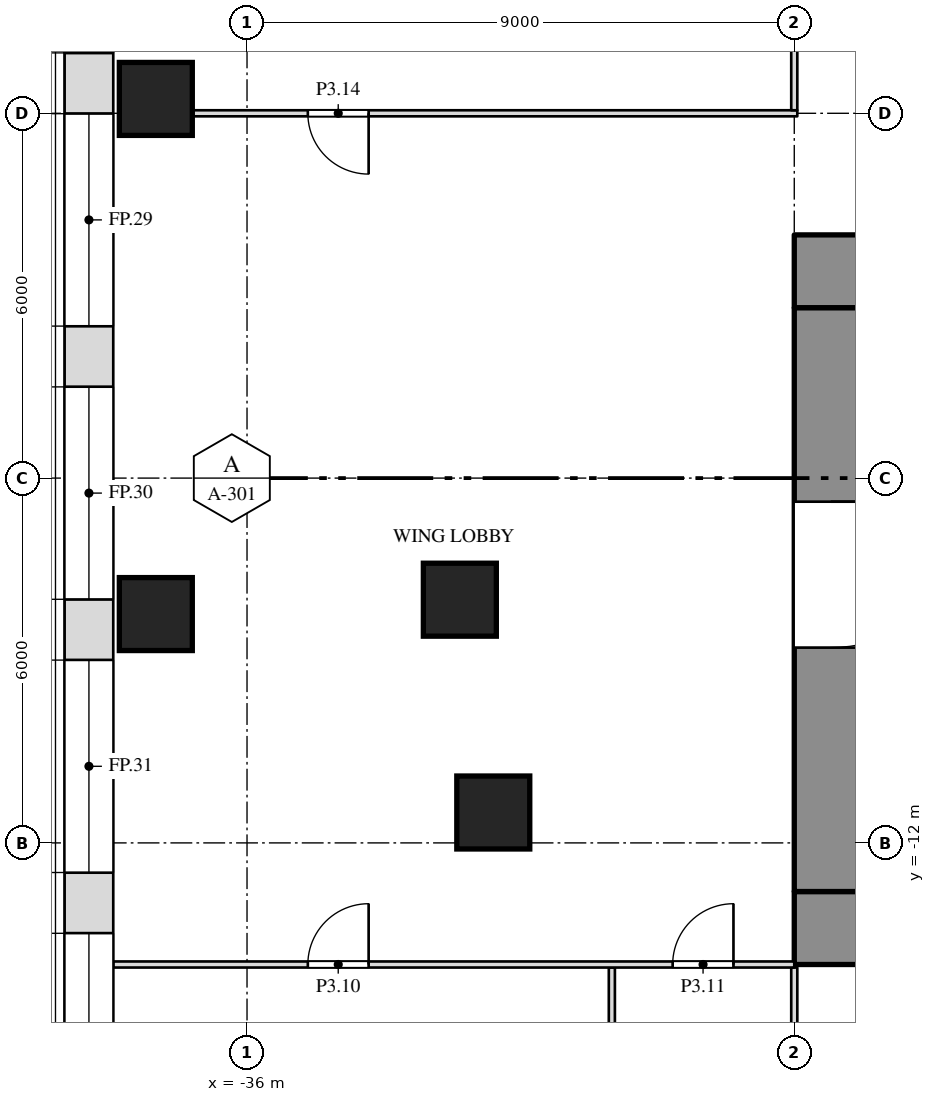
"""IFC4 building model, lengths in metres.
Left out: names, types, materials, properties, quantities, classifications, styles, units other than length and angle.
Written with IfcOpenShell. Run it as: python <this file> out.ifc"""

import sys

from ifc_helpers import new_model, si_unit, direction, frame, frame_2d, origin, origin_2d, place, context, subcontext, project, spatial, rectangle, extrude, element, fill, save


model = new_model("IFC4")
c1 = context("Model", 3, precision=1e-05, world=origin(), true_north=direction((0.0, 1.0)))
c2 = subcontext(c1, "Body", "Model", "MODEL_VIEW")
j1 = project(units=[si_unit("LENGTHUNIT", "METRE"), si_unit("PLANEANGLEUNIT", "RADIAN")], contexts=[c1])
p1 = place(None, origin())
s1 = spatial("IfcSite", under=j1, at=p1, CompositionType="ELEMENT")
p2 = place(p1, origin())
s2 = spatial("IfcBuilding", under=s1, at=p2, CompositionType="ELEMENT")
p3 = place(p2, frame((0.0, 0.0, 21.0)))
s3 = spatial("IfcBuildingStorey", under=s2, at=p3, CompositionType="ELEMENT", Elevation=21.0)
for number, where, z_axis, x_axis in (
    (1, (-31.95, -11.5, 0.0), (0.0, 0.0, 1.0), (1.0, 0.0, 0.0)),
    (2, (-37.5, -8.236, 0.0), (0.0, 0.0, 1.0), (1.0, 0.0, 0.0)),
    (3, (-32.5, -8.0, 0.0), (0.0, 0.0, 1.0), (1.0, 0.0, 0.0)),
    (4, (-37.5, 0.236, 0.0), (0.0, 0.0, 1.0), (1.0, 0.0, 0.0)),
):
    element("IfcColumn", number, at=place(p3, frame(where, z_axis=z_axis, x_axis=x_axis)), inside=s3, PredefinedType="COLUMN", context=c2, shape_type="SweptSolid", body=[
        extrude(rectangle(XDim=1.2, YDim=1.2, at=origin_2d()), origin(), (0.0, 0.0, 1.0), 6.0),
    ])
p4 = place(p3, frame((-27.0, -2.6, 0.0), z_axis=(0.0, 0.0, 1.0), x_axis=(1.0, 0.0, 0.0)))
e5 = element("IfcWall", 5, at=p4, inside=s3, PredefinedType="SHEAR", context=c2, shape_type="SweptSolid", body=[
    extrude(rectangle(XDim=54.0, YDim=1.2, at=frame_2d((27.0, 0.0))), origin(), (0.0, 0.0, 1.0), 5.7),
])
p5 = place(p3, frame((-27.0, -13.4, 0.0), z_axis=(0.0, 0.0, 1.0), x_axis=(1.0, 0.0, 0.0)))
e6 = element("IfcWall", 6, at=p5, inside=s3, PredefinedType="SHEAR", context=c2, shape_type="SweptSolid", body=[
    extrude(rectangle(XDim=54.0, YDim=1.2, at=frame_2d((27.0, 0.0))), origin(), (0.0, 0.0, 1.0), 5.7),
])
p6 = place(p5, frame((16.45, 0.0, 0.0)))
e7 = element("IfcOpeningElement", 7, at=p6, cuts=e6, PredefinedType="OPENING", context=c2, shape_type="SweptSolid", body=[
    extrude(rectangle(XDim=1.0, YDim=2.1, at=frame_2d((0.5, 1.05))), frame((0.0, 0.612, 0.0), z_axis=(0.0, -1.0, 0.0), x_axis=(1.0, 0.0, 0.0)), (0.0, 0.0, 1.0), 1.224),
])
p7 = place(p5, frame((36.55, 0.0, 0.0)))
e8 = element("IfcOpeningElement", 8, at=p7, cuts=e6, PredefinedType="OPENING", context=c2, shape_type="SweptSolid", body=[
    extrude(rectangle(XDim=1.0, YDim=2.1, at=frame_2d((0.5, 1.05))), frame((0.0, 0.612, 0.0), z_axis=(0.0, -1.0, 0.0), x_axis=(1.0, 0.0, 0.0)), (0.0, 0.0, 1.0), 1.224),
])
p8 = place(p3, frame((-26.4, -12.8, 0.0), z_axis=(0.0, 0.0, 1.0), x_axis=(0.0, 1.0, 0.0)))
e9 = element("IfcWall", 9, at=p8, inside=s3, PredefinedType="SHEAR", context=c2, shape_type="SweptSolid", body=[
    extrude(rectangle(XDim=9.6, YDim=1.2, at=frame_2d((4.8, 0.0))), origin(), (0.0, 0.0, 1.0), 5.7),
])
p9 = place(p8, frame((4.012, 0.0, 0.0)))
e10 = element("IfcOpeningElement", 10, at=p9, cuts=e9, PredefinedType="OPENING", context=c2, shape_type="SweptSolid", body=[
    extrude(rectangle(XDim=2.4, YDim=2.1, at=frame_2d((1.2, 1.05))), frame((0.0, 0.612, 0.0), z_axis=(0.0, -1.0, 0.0), x_axis=(1.0, 0.0, 0.0)), (0.0, 0.0, 1.0), 1.224),
])
p10 = place(p3, frame((-30.0, -27.2, 0.0), z_axis=(0.0, 0.0, 1.0), x_axis=(0.0, 1.0, 0.0)))
e11 = element("IfcWall", 11, at=p10, inside=s3, PredefinedType="PARTITIONING", context=c2, shape_type="SweptSolid", body=[
    extrude(rectangle(XDim=13.15, YDim=0.1, at=frame_2d((6.575, 0.0))), origin(), (0.0, 0.0, 1.0), 5.7),
])
p11 = place(p3, frame((-27.0, -16.9, 0.0), z_axis=(0.0, 0.0, 1.0), x_axis=(0.0, 1.0, 0.0)))
e12 = element("IfcWall", 12, at=p11, inside=s3, PredefinedType="PARTITIONING", context=c2, shape_type="SweptSolid", body=[
    extrude(rectangle(XDim=2.85, YDim=0.1, at=frame_2d((1.425, 0.0))), origin(), (0.0, 0.0, 1.0), 5.088),
])
p12 = place(p3, frame((-38.2, -14.0, 0.0), z_axis=(0.0, 0.0, 1.0), x_axis=(1.0, 0.0, 0.0)))
e13 = element("IfcWall", 13, at=p12, inside=s3, PredefinedType="PARTITIONING", context=c2, shape_type="SweptSolid", body=[
    extrude(rectangle(XDim=11.2, YDim=0.1, at=frame_2d((5.6, 0.0))), origin(), (0.0, 0.0, 1.0), 5.7),
])
p13 = place(p12, frame((3.2, 0.0, 0.0)))
e14 = element("IfcOpeningElement", 14, at=p13, cuts=e13, PredefinedType="OPENING", context=c2, shape_type="SweptSolid", body=[
    extrude(rectangle(XDim=1.0, YDim=2.1, at=frame_2d((0.5, 1.05))), frame((0.0, 0.062, 0.0), z_axis=(0.0, -1.0, 0.0), x_axis=(1.0, 0.0, 0.0)), (0.0, 0.0, 1.0), 0.124),
])
p14 = place(p12, frame((9.2, 0.0, 0.0)))
e15 = element("IfcOpeningElement", 15, at=p14, cuts=e13, PredefinedType="OPENING", context=c2, shape_type="SweptSolid", body=[
    extrude(rectangle(XDim=1.0, YDim=2.1, at=frame_2d((0.5, 1.05))), frame((0.0, 0.062, 0.0), z_axis=(0.0, -1.0, 0.0), x_axis=(1.0, 0.0, 0.0)), (0.0, 0.0, 1.0), 0.124),
])
p15 = place(p3, frame((-36.9, 0.0, 0.0), z_axis=(0.0, 0.0, 1.0), x_axis=(1.0, 0.0, 0.0)))
e16 = element("IfcWall", 16, at=p15, inside=s3, PredefinedType="PARTITIONING", context=c2, shape_type="SweptSolid", body=[
    extrude(rectangle(XDim=9.95, YDim=0.1, at=frame_2d((4.975, 0.0))), origin(), (0.0, 0.0, 1.0), 5.088),
])
p16 = place(p15, frame((1.9, 0.0, 0.0)))
e17 = element("IfcOpeningElement", 17, at=p16, cuts=e16, PredefinedType="OPENING", context=c2, shape_type="SweptSolid", body=[
    extrude(rectangle(XDim=1.0, YDim=2.1, at=frame_2d((0.5, 1.05))), frame((0.0, 0.062, 0.0), z_axis=(0.0, -1.0, 0.0), x_axis=(1.0, 0.0, 0.0)), (0.0, 0.0, 1.0), 0.124),
])
p17 = place(p3, frame((-27.0, 0.05, 0.0), z_axis=(0.0, 0.0, 1.0), x_axis=(0.0, 1.0, 0.0)))
e18 = element("IfcWall", 18, at=p17, inside=s3, PredefinedType="PARTITIONING", context=c2, shape_type="SweptSolid", body=[
    extrude(rectangle(XDim=4.166, YDim=0.1, at=frame_2d((2.083, 0.0))), origin(), (0.0, 0.0, 1.0), 5.088),
])
p18 = place(p3, frame((-38.6, 13.948, 0.0), z_axis=(0.0, 0.0, 1.0), x_axis=(0.0, -1.0, 0.0)))
e19 = element("IfcWall", 19, at=p18, inside=s3, PredefinedType="SOLIDWALL", context=c2, shape_type="SweptSolid", body=[
    extrude(rectangle(XDim=35.895, YDim=0.8, at=frame_2d((17.948, 0.0))), origin(), (0.0, 0.0, 1.0), 5.7),
])
p19 = place(p18, frame((4.964, 0.0, 1.0)))
e20 = element("IfcOpeningElement", 20, at=p19, cuts=e19, PredefinedType="OPENING", context=c2, shape_type="SweptSolid", body=[
    extrude(rectangle(XDim=3.5, YDim=4.0, at=frame_2d((1.75, 2.0))), frame((0.0, 0.412, 0.0), z_axis=(0.0, -1.0, 0.0), x_axis=(1.0, 0.0, 0.0)), (0.0, 0.0, 1.0), 0.824),
])
p20 = place(p18, frame((9.458, 0.0, 1.0)))
e21 = element("IfcOpeningElement", 21, at=p20, cuts=e19, PredefinedType="OPENING", context=c2, shape_type="SweptSolid", body=[
    extrude(rectangle(XDim=3.5, YDim=4.0, at=frame_2d((1.75, 2.0))), frame((0.0, 0.412, 0.0), z_axis=(0.0, -1.0, 0.0), x_axis=(1.0, 0.0, 0.0)), (0.0, 0.0, 1.0), 0.824),
])
p21 = place(p18, frame((13.951, 0.0, 1.0)))
e22 = element("IfcOpeningElement", 22, at=p21, cuts=e19, PredefinedType="OPENING", context=c2, shape_type="SweptSolid", body=[
    extrude(rectangle(XDim=3.5, YDim=4.0, at=frame_2d((1.75, 2.0))), frame((0.0, 0.412, 0.0), z_axis=(0.0, -1.0, 0.0), x_axis=(1.0, 0.0, 0.0)), (0.0, 0.0, 1.0), 0.824),
])
p22 = place(p18, frame((18.444, 0.0, 1.0)))
e23 = element("IfcOpeningElement", 23, at=p22, cuts=e19, PredefinedType="OPENING", context=c2, shape_type="SweptSolid", body=[
    extrude(rectangle(XDim=3.5, YDim=4.0, at=frame_2d((1.75, 2.0))), frame((0.0, 0.412, 0.0), z_axis=(0.0, -1.0, 0.0), x_axis=(1.0, 0.0, 0.0)), (0.0, 0.0, 1.0), 0.824),
])
p23 = place(p18, frame((22.938, 0.0, 1.0)))
e24 = element("IfcOpeningElement", 24, at=p23, cuts=e19, PredefinedType="OPENING", context=c2, shape_type="SweptSolid", body=[
    extrude(rectangle(XDim=3.5, YDim=4.0, at=frame_2d((1.75, 2.0))), frame((0.0, 0.412, 0.0), z_axis=(0.0, -1.0, 0.0), x_axis=(1.0, 0.0, 0.0)), (0.0, 0.0, 1.0), 0.824),
])
p24 = place(p18, frame((27.431, 0.0, 1.0)))
e25 = element("IfcOpeningElement", 25, at=p24, cuts=e19, PredefinedType="OPENING", context=c2, shape_type="SweptSolid", body=[
    extrude(rectangle(XDim=3.5, YDim=4.0, at=frame_2d((1.75, 2.0))), frame((0.0, 0.412, 0.0), z_axis=(0.0, -1.0, 0.0), x_axis=(1.0, 0.0, 0.0)), (0.0, 0.0, 1.0), 0.824),
])
p25 = place(p13, origin())
e26 = element("IfcDoor", 26, at=p25, inside=s3, OperationType="SINGLE_SWING_RIGHT", PredefinedType="DOOR", context=c2, shape_type="SweptSolid", body=[
    extrude(rectangle(XDim=1.0, YDim=2.1, at=frame_2d((0.5, 1.05))), frame((0.0, 0.025, 0.0), z_axis=(0.0, -1.0, 0.0), x_axis=(1.0, 0.0, 0.0)), (0.0, 0.0, 1.0), 0.05),
])
fill(e14, e26)
p26 = place(p14, origin())
e27 = element("IfcDoor", 27, at=p26, inside=s3, OperationType="SINGLE_SWING_RIGHT", PredefinedType="DOOR", context=c2, shape_type="SweptSolid", body=[
    extrude(rectangle(XDim=1.0, YDim=2.1, at=frame_2d((0.5, 1.05))), frame((0.0, 0.025, 0.0), z_axis=(0.0, -1.0, 0.0), x_axis=(1.0, 0.0, 0.0)), (0.0, 0.0, 1.0), 0.05),
])
fill(e15, e27)
p27 = place(p16, origin())
e28 = element("IfcDoor", 28, at=p27, inside=s3, OperationType="SINGLE_SWING_LEFT", PredefinedType="DOOR", context=c2, shape_type="SweptSolid", body=[
    extrude(rectangle(XDim=1.0, YDim=2.1, at=frame_2d((0.5, 1.05))), frame((0.0, 0.025, 0.0), z_axis=(0.0, -1.0, 0.0), x_axis=(1.0, 0.0, 0.0)), (0.0, 0.0, 1.0), 0.05),
])
fill(e17, e28)
p28 = place(p20, origin())
e29 = element("IfcWindow", 29, at=p28, inside=s3, PartitioningType="SINGLE_PANEL", PredefinedType="WINDOW", context=c2, shape_type="SweptSolid", body=[
    extrude(rectangle(XDim=3.5, YDim=4.0, at=frame_2d((1.75, 2.0))), frame((0.0, 0.03, 0.0), z_axis=(0.0, -1.0, 0.0), x_axis=(1.0, 0.0, 0.0)), (0.0, 0.0, 1.0), 0.06),
])
fill(e21, e29)
p29 = place(p21, origin())
e30 = element("IfcWindow", 30, at=p29, inside=s3, PartitioningType="SINGLE_PANEL", PredefinedType="WINDOW", context=c2, shape_type="SweptSolid", body=[
    extrude(rectangle(XDim=3.5, YDim=4.0, at=frame_2d((1.75, 2.0))), frame((0.0, 0.03, 0.0), z_axis=(0.0, -1.0, 0.0), x_axis=(1.0, 0.0, 0.0)), (0.0, 0.0, 1.0), 0.06),
])
fill(e22, e30)
p30 = place(p22, origin())
e31 = element("IfcWindow", 31, at=p30, inside=s3, PartitioningType="SINGLE_PANEL", PredefinedType="WINDOW", context=c2, shape_type="SweptSolid", body=[
    extrude(rectangle(XDim=3.5, YDim=4.0, at=frame_2d((1.75, 2.0))), frame((0.0, 0.03, 0.0), z_axis=(0.0, -1.0, 0.0), x_axis=(1.0, 0.0, 0.0)), (0.0, 0.0, 1.0), 0.06),
])
fill(e23, e31)
p31 = place(p23, origin())
e32 = element("IfcWindow", 32, at=p31, inside=s3, PartitioningType="SINGLE_PANEL", PredefinedType="WINDOW", context=c2, shape_type="SweptSolid", body=[
    extrude(rectangle(XDim=3.5, YDim=4.0, at=frame_2d((1.75, 2.0))), frame((0.0, 0.03, 0.0), z_axis=(0.0, -1.0, 0.0), x_axis=(1.0, 0.0, 0.0)), (0.0, 0.0, 1.0), 0.06),
])
fill(e24, e32)
p32 = place(p24, origin())
e33 = element("IfcWindow", 33, at=p32, inside=s3, PartitioningType="SINGLE_PANEL", PredefinedType="WINDOW", context=c2, shape_type="SweptSolid", body=[
    extrude(rectangle(XDim=3.5, YDim=4.0, at=frame_2d((1.75, 2.0))), frame((0.0, 0.03, 0.0), z_axis=(0.0, -1.0, 0.0), x_axis=(1.0, 0.0, 0.0)), (0.0, 0.0, 1.0), 0.06),
])
fill(e25, e33)
p33 = place(p9, origin())
e34 = element("IfcDoor", 34, at=p33, inside=s3, OperationType="DOUBLE_DOOR_SINGLE_SWING", PredefinedType="DOOR", context=c2, shape_type="SweptSolid", body=[
    extrude(rectangle(XDim=2.4, YDim=2.1, at=frame_2d((1.2, 1.05))), frame((0.0, 0.025, 0.0), z_axis=(0.0, -1.0, 0.0), x_axis=(1.0, 0.0, 0.0)), (0.0, 0.0, 1.0), 0.05),
])
fill(e10, e34)
save(model, sys.argv[1])
